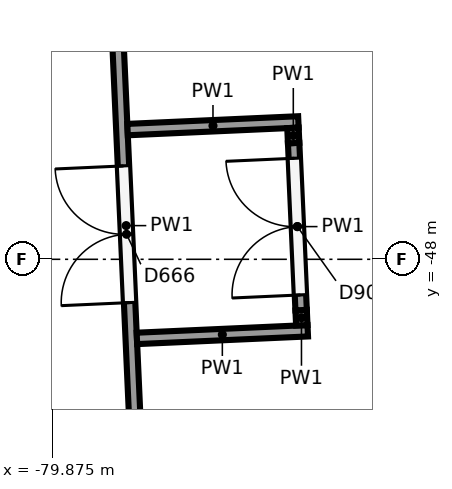
"""IFC4 building model, lengths in metres.
Left out: names, types, materials, properties, quantities, classifications, styles, units other than length and angle.
Written with IfcOpenShell. Run it as: python <this file> out.ifc"""

import sys

from ifc_helpers import new_model, si_unit, direction, frame, frame_2d, origin, place, context, subcontext, project, spatial, rectangle, extrude, element, fill, save


model = new_model("IFC4")
c1 = context("Model", 3, precision=1e-05, world=origin(), true_north=direction((0.0, 1.0)))
c2 = subcontext(c1, "Body", "Model", "MODEL_VIEW")
j1 = project(units=[si_unit("LENGTHUNIT", "METRE"), si_unit("PLANEANGLEUNIT", "RADIAN")], contexts=[c1])
p1 = place(None, origin())
s1 = spatial("IfcSite", under=j1, at=p1, CompositionType="ELEMENT")
p2 = place(p1, origin())
s2 = spatial("IfcBuilding", under=s1, at=p2, CompositionType="ELEMENT")
p3 = place(p2, frame((0.0, 0.0, 6.5)))
s3 = spatial("IfcBuildingStorey", under=s2, at=p3, CompositionType="ELEMENT", Elevation=6.5)
p4 = place(p3, frame((-78.691, -52.266, 0.0), z_axis=(0.0, 0.0, 1.0), x_axis=(-0.044749816806, 0.998998225172, 0.0)))
e1 = element("IfcWall", 1, at=p4, inside=s3, PredefinedType="PARTITIONING", context=c2, shape_type="SweptSolid", body=[
    extrude(rectangle(XDim=9.427, YDim=0.15, at=frame_2d((4.714, 0.0))), origin(), (0.0, 0.0, 1.0), 5.15),
])
p5 = place(p4, frame((3.7, 0.0, 0.0)))
e2 = element("IfcOpeningElement", 2, at=p5, cuts=e1, PredefinedType="OPENING", context=c2, shape_type="SweptSolid", body=[
    extrude(rectangle(XDim=1.8, YDim=2.1, at=frame_2d((0.9, 1.05))), frame((0.0, 0.085, 0.0), z_axis=(0.0, -1.0, 0.0), x_axis=(1.0, 0.0, 0.0)), (0.0, 0.0, 1.0), 0.17),
])
p6 = place(p3, frame((-78.761, -49.041, 0.0), z_axis=(0.0, 0.0, 1.0), x_axis=(0.998995432738, 0.044812111841, 0.0)))
e3 = element("IfcWall", 3, at=p6, inside=s3, PredefinedType="PARTITIONING", context=c2, shape_type="SweptSolid", body=[
    extrude(rectangle(XDim=2.25, YDim=0.15, at=frame_2d((1.125, 0.0))), origin(), (0.0, 0.0, 1.0), 5.15),
])
p7 = place(p3, frame((-78.884, -46.293, 0.0), z_axis=(0.0, 0.0, 1.0), x_axis=(0.998995214814, 0.044816969772, 0.0)))
e4 = element("IfcWall", 4, at=p7, inside=s3, PredefinedType="PARTITIONING", context=c2, shape_type="SweptSolid", body=[
    extrude(rectangle(XDim=2.25, YDim=0.15, at=frame_2d((1.125, 0.0))), origin(), (0.0, 0.0, 1.0), 5.15),
])
p8 = place(p3, frame((-76.591, -48.868, 0.0), z_axis=(0.0, 0.0, 1.0), x_axis=(-0.04518607304, 0.99897858776, 0.0)))
e5 = element("IfcWall", 5, at=p8, inside=s3, PredefinedType="PARTITIONING", context=c2, shape_type="SweptSolid", body=[
    extrude(rectangle(XDim=0.2, YDim=0.15, at=frame_2d((0.1, 0.0))), origin(), (0.0, 0.0, 1.0), 5.15),
])
p9 = place(p3, frame((-76.6, -48.669, 0.0), z_axis=(0.0, 0.0, 1.0), x_axis=(-0.04471807814, 0.99899964639, 0.0)))
e6 = element("IfcWall", 6, at=p9, inside=s3, PredefinedType="PARTITIONING", context=c2, shape_type="SweptSolid", body=[
    extrude(rectangle(XDim=2.2, YDim=0.15, at=frame_2d((1.1, 0.0))), origin(), (0.0, 0.0, 1.0), 5.15),
])
p10 = place(p9, frame((0.2, 0.0, 0.0)))
e7 = element("IfcOpeningElement", 7, at=p10, cuts=e6, PredefinedType="OPENING", context=c2, shape_type="SweptSolid", body=[
    extrude(rectangle(XDim=1.8, YDim=2.1, at=frame_2d((0.9, 1.05))), frame((0.0, 0.085, 0.0), z_axis=(0.0, -1.0, 0.0), x_axis=(1.0, 0.0, 0.0)), (0.0, 0.0, 1.0), 0.17),
])
p11 = place(p3, frame((-76.699, -46.471, 0.0), z_axis=(0.0, 0.0, 1.0), x_axis=(-0.04518607304, 0.99897858776, 0.0)))
e8 = element("IfcWall", 8, at=p11, inside=s3, PredefinedType="PARTITIONING", context=c2, shape_type="SweptSolid", body=[
    extrude(rectangle(XDim=0.2, YDim=0.15, at=frame_2d((0.1, 0.0))), origin(), (0.0, 0.0, 1.0), 5.15),
])
p12 = place(p5, origin())
e9 = element("IfcDoor", 9, at=p12, inside=s3, OperationType="DOUBLE_DOOR_SINGLE_SWING", PredefinedType="DOOR", context=c2, shape_type="SweptSolid", body=[
    extrude(rectangle(XDim=1.8, YDim=2.1, at=frame_2d((0.9, 1.05))), frame((0.0, 0.025, 0.0), z_axis=(0.0, -1.0, 0.0), x_axis=(1.0, 0.0, 0.0)), (0.0, 0.0, 1.0), 0.05),
])
fill(e2, e9)
p13 = place(p10, origin())
e10 = element("IfcDoor", 10, at=p13, inside=s3, OperationType="DOUBLE_DOOR_SINGLE_SWING", PredefinedType="DOOR", context=c2, shape_type="SweptSolid", body=[
    extrude(rectangle(XDim=1.8, YDim=2.1, at=frame_2d((0.9, 1.05))), frame((0.0, 0.025, 0.0), z_axis=(0.0, -1.0, 0.0), x_axis=(1.0, 0.0, 0.0)), (0.0, 0.0, 1.0), 0.05),
])
fill(e7, e10)
save(model, sys.argv[1])
